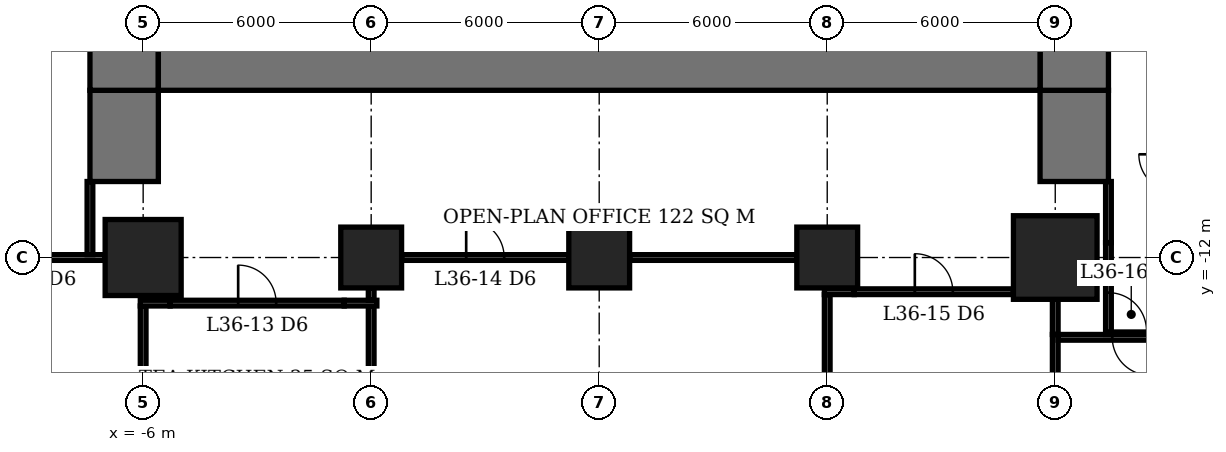
"""IFC4 building model, lengths in metres.
Left out: names, types, materials, properties, quantities, classifications, styles, units other than length and angle.
Written with IfcOpenShell. Run it as: python <this file> out.ifc"""

import sys

from ifc_helpers import new_model, si_unit, direction, frame, frame_2d, origin, origin_2d, place, context, subcontext, project, spatial, rectangle, extrude, element, fill, save


model = new_model("IFC4")
c1 = context("Model", 3, precision=1e-05, world=origin(), true_north=direction((0.0, 1.0)))
c2 = subcontext(c1, "Body", "Model", "MODEL_VIEW")
j1 = project(units=[si_unit("LENGTHUNIT", "METRE"), si_unit("PLANEANGLEUNIT", "RADIAN")], contexts=[c1])
p1 = place(None, origin())
s1 = spatial("IfcSite", under=j1, at=p1, CompositionType="ELEMENT")
p2 = place(p1, origin())
s2 = spatial("IfcBuilding", under=s1, at=p2, CompositionType="ELEMENT")
p3 = place(p2, frame((0.0, 0.0, 148.4)))
s3 = spatial("IfcBuildingStorey", under=s2, at=p3, CompositionType="ELEMENT", Elevation=148.4)
p4 = place(p3, frame((-6.0, -12.0, 0.0), z_axis=(0.0, 0.0, 1.0), x_axis=(1.0, 0.0, 0.0)))
e1 = element("IfcColumn", 1, at=p4, inside=s3, PredefinedType="COLUMN", context=c2, shape_type="SweptSolid", body=[
    extrude(rectangle(XDim=2.0, YDim=2.0, at=origin_2d()), origin(), (0.0, 0.0, 1.0), 3.9),
])
for number, where, z_axis, x_axis in (
    (2, (0.0, -12.0, 0.0), (0.0, 0.0, 1.0), (1.0, 0.0, 0.0)),
    (3, (6.0, -12.0, 0.0), (0.0, 0.0, 1.0), (1.0, 0.0, 0.0)),
    (4, (12.0, -12.0, 0.0), (0.0, 0.0, 1.0), (1.0, 0.0, 0.0)),
):
    element("IfcColumn", number, at=place(p3, frame(where, z_axis=z_axis, x_axis=x_axis)), inside=s3, PredefinedType="COLUMN", context=c2, shape_type="SweptSolid", body=[
        extrude(rectangle(XDim=1.6, YDim=1.6, at=origin_2d()), origin(), (0.0, 0.0, 1.0), 3.9),
    ])
p5 = place(p3, frame((18.0, -12.0, 0.0), z_axis=(0.0, 0.0, 1.0), x_axis=(1.0, 0.0, 0.0)))
e5 = element("IfcColumn", 5, at=p5, inside=s3, PredefinedType="COLUMN", context=c2, shape_type="SweptSolid", body=[
    extrude(rectangle(XDim=2.2, YDim=2.2, at=origin_2d()), origin(), (0.0, 0.0, 1.0), 3.9),
])
p6 = place(p3, frame((-5.6, -6.6, 0.0), z_axis=(0.0, 0.0, 1.0), x_axis=(1.0, 0.0, 0.0)))
e6 = element("IfcWall", 6, at=p6, inside=s3, PredefinedType="SHEAR", context=c2, shape_type="SweptSolid", body=[
    extrude(rectangle(XDim=23.2, YDim=2.0, at=frame_2d((11.6, 0.0))), origin(), (0.0, 0.0, 1.0), 3.9),
])
p7 = place(p3, frame((-6.5, -7.6, 0.0), z_axis=(0.0, 0.0, 1.0), x_axis=(0.0, 1.0, 0.0)))
e7 = element("IfcWall", 7, at=p7, inside=s3, PredefinedType="SHEAR", context=c2, shape_type="SweptSolid", body=[
    extrude(rectangle(XDim=21.2, YDim=1.8, at=frame_2d((10.6, 0.0))), origin(), (0.0, 0.0, 1.0), 3.9),
])
p8 = place(p7, frame((7.8, 0.0, 0.0)))
e8 = element("IfcOpeningElement", 8, at=p8, cuts=e7, PredefinedType="OPENING", context=c2, shape_type="SweptSolid", body=[
    extrude(rectangle(XDim=1.8, YDim=2.4, at=frame_2d((0.9, 1.2))), frame((0.0, 0.91, 0.0), z_axis=(0.0, -1.0, 0.0), x_axis=(1.0, 0.0, 0.0)), (0.0, 0.0, 1.0), 1.82),
])
p9 = place(p3, frame((18.5, -7.6, 0.0), z_axis=(0.0, 0.0, 1.0), x_axis=(0.0, 1.0, 0.0)))
e9 = element("IfcWall", 9, at=p9, inside=s3, PredefinedType="SHEAR", context=c2, shape_type="SweptSolid", body=[
    extrude(rectangle(XDim=21.2, YDim=1.8, at=frame_2d((10.6, 0.0))), origin(), (0.0, 0.0, 1.0), 3.9),
])
p10 = place(p9, frame((9.2, 0.0, 0.0)))
e10 = element("IfcOpeningElement", 10, at=p10, cuts=e9, PredefinedType="OPENING", context=c2, shape_type="SweptSolid", body=[
    extrude(rectangle(XDim=1.8, YDim=2.4, at=frame_2d((0.9, 1.2))), frame((0.0, 0.91, 0.0), z_axis=(0.0, -1.0, 0.0), x_axis=(1.0, 0.0, 0.0)), (0.0, 0.0, 1.0), 1.82),
])
for number, where, z_axis, x_axis in (
    (11, (-6.5, -10.0, 0.0), (0.0, 0.0, 1.0), (0.0, 1.0, 0.0)),
    (12, (18.5, -10.0, 0.0), (0.0, 0.0, 1.0), (0.0, 1.0, 0.0)),
):
    element("IfcWall", number, at=place(p3, frame(where, z_axis=z_axis, x_axis=x_axis)), inside=s3, PredefinedType="SHEAR", context=c2, shape_type="SweptSolid", body=[
        extrude(rectangle(XDim=2.4, YDim=1.8, at=frame_2d((1.2, 0.0))), origin(), (0.0, 0.0, 1.0), 3.9),
    ])
p11 = place(p3, frame((21.892, -14.1, 0.0), z_axis=(0.0, 0.0, 1.0), x_axis=(-1.0, 0.0, 0.0)))
e13 = element("IfcWall", 13, at=p11, inside=s3, PredefinedType="PARTITIONING", context=c2, shape_type="SweptSolid", body=[
    extrude(rectangle(XDim=3.817, YDim=0.15, at=frame_2d((1.909, 0.0))), origin(), (0.0, 0.0, 1.0), 2.65),
])
p12 = place(p11, frame((1.392, 0.0, 0.0)))
e14 = element("IfcOpeningElement", 14, at=p12, cuts=e13, PredefinedType="OPENING", context=c2, shape_type="SweptSolid", body=[
    extrude(rectangle(XDim=1.0, YDim=2.1, at=frame_2d((0.5, 1.05))), frame((0.0, 0.085, 0.0), z_axis=(0.0, -1.0, 0.0), x_axis=(1.0, 0.0, 0.0)), (0.0, 0.0, 1.0), 0.17),
])
p13 = place(p3, frame((-6.075, -13.2, 0.0), z_axis=(0.0, 0.0, 1.0), x_axis=(1.0, 0.0, 0.0)))
e15 = element("IfcWall", 15, at=p13, inside=s3, PredefinedType="PARTITIONING", context=c2, shape_type="SweptSolid", body=[
    extrude(rectangle(XDim=0.785, YDim=0.15, at=frame_2d((0.393, 0.0))), origin(), (0.0, 0.0, 1.0), 2.65),
])
p14 = place(p3, frame((-5.29, -13.2, 0.0), z_axis=(0.0, 0.0, 1.0), x_axis=(1.0, 0.0, 0.0)))
e16 = element("IfcWall", 16, at=p14, inside=s3, PredefinedType="PARTITIONING", context=c2, shape_type="SweptSolid", body=[
    extrude(rectangle(XDim=4.58, YDim=0.15, at=frame_2d((2.29, 0.0))), origin(), (0.0, 0.0, 1.0), 3.65),
])
p15 = place(p14, frame((1.79, 0.0, 0.0)))
e17 = element("IfcOpeningElement", 17, at=p15, cuts=e16, PredefinedType="OPENING", context=c2, shape_type="SweptSolid", body=[
    extrude(rectangle(XDim=1.0, YDim=2.1, at=frame_2d((0.5, 1.05))), frame((0.0, 0.085, 0.0), z_axis=(0.0, -1.0, 0.0), x_axis=(1.0, 0.0, 0.0)), (0.0, 0.0, 1.0), 0.17),
])
p16 = place(p3, frame((-0.71, -13.2, 0.0), z_axis=(0.0, 0.0, 1.0), x_axis=(1.0, 0.0, 0.0)))
e18 = element("IfcWall", 18, at=p16, inside=s3, PredefinedType="PARTITIONING", context=c2, shape_type="SweptSolid", body=[
    extrude(rectangle(XDim=0.86, YDim=0.15, at=frame_2d((0.43, 0.0))), origin(), (0.0, 0.0, 1.0), 2.65),
])
p17 = place(p3, frame((11.925, -12.9, 0.0), z_axis=(0.0, 0.0, 1.0), x_axis=(1.0, 0.0, 0.0)))
e19 = element("IfcWall", 19, at=p17, inside=s3, PredefinedType="PARTITIONING", context=c2, shape_type="SweptSolid", body=[
    extrude(rectangle(XDim=0.785, YDim=0.15, at=frame_2d((0.393, 0.0))), origin(), (0.0, 0.0, 1.0), 2.65),
])
p18 = place(p3, frame((12.71, -12.9, 0.0), z_axis=(0.0, 0.0, 1.0), x_axis=(1.0, 0.0, 0.0)))
e20 = element("IfcWall", 20, at=p18, inside=s3, PredefinedType="PARTITIONING", context=c2, shape_type="SweptSolid", body=[
    extrude(rectangle(XDim=4.19, YDim=0.15, at=frame_2d((2.095, 0.0))), origin(), (0.0, 0.0, 1.0), 3.65),
])
p19 = place(p18, frame((1.595, 0.0, 0.0)))
e21 = element("IfcOpeningElement", 21, at=p19, cuts=e20, PredefinedType="OPENING", context=c2, shape_type="SweptSolid", body=[
    extrude(rectangle(XDim=1.0, YDim=2.1, at=frame_2d((0.5, 1.05))), frame((0.0, 0.085, 0.0), z_axis=(0.0, -1.0, 0.0), x_axis=(1.0, 0.0, 0.0)), (0.0, 0.0, 1.0), 0.17),
])
p20 = place(p3, frame((-11.2, -12.0, 0.0), z_axis=(0.0, 0.0, 1.0), x_axis=(1.0, 0.0, 0.0)))
e22 = element("IfcWall", 22, at=p20, inside=s3, PredefinedType="PARTITIONING", context=c2, shape_type="SweptSolid", body=[
    extrude(rectangle(XDim=4.2, YDim=0.15, at=frame_2d((2.1, 0.0))), origin(), (0.0, 0.0, 1.0), 3.65),
])
p21 = place(p20, frame((1.6, 0.0, 0.0)))
e23 = element("IfcOpeningElement", 23, at=p21, cuts=e22, PredefinedType="OPENING", context=c2, shape_type="SweptSolid", body=[
    extrude(rectangle(XDim=1.0, YDim=2.1, at=frame_2d((0.5, 1.05))), frame((0.0, 0.085, 0.0), z_axis=(0.0, -1.0, 0.0), x_axis=(1.0, 0.0, 0.0)), (0.0, 0.0, 1.0), 0.17),
])
p22 = place(p3, frame((0.8, -12.0, 0.0), z_axis=(0.0, 0.0, 1.0), x_axis=(1.0, 0.0, 0.0)))
e24 = element("IfcWall", 24, at=p22, inside=s3, PredefinedType="PARTITIONING", context=c2, shape_type="SweptSolid", body=[
    extrude(rectangle(XDim=4.4, YDim=0.15, at=frame_2d((2.2, 0.0))), origin(), (0.0, 0.0, 1.0), 3.65),
])
p23 = place(p22, frame((1.7, 0.0, 0.0)))
e25 = element("IfcOpeningElement", 25, at=p23, cuts=e24, PredefinedType="OPENING", context=c2, shape_type="SweptSolid", body=[
    extrude(rectangle(XDim=1.0, YDim=2.1, at=frame_2d((0.5, 1.05))), frame((0.0, 0.085, 0.0), z_axis=(0.0, -1.0, 0.0), x_axis=(1.0, 0.0, 0.0)), (0.0, 0.0, 1.0), 0.17),
])
p24 = place(p3, frame((6.8, -12.0, 0.0), z_axis=(0.0, 0.0, 1.0), x_axis=(1.0, 0.0, 0.0)))
e26 = element("IfcWall", 26, at=p24, inside=s3, PredefinedType="PARTITIONING", context=c2, shape_type="SweptSolid", body=[
    extrude(rectangle(XDim=4.4, YDim=0.15, at=frame_2d((2.2, 0.0))), origin(), (0.0, 0.0, 1.0), 3.65),
])
for number, where, z_axis, x_axis in (
    (27, (-6.0, -16.31, 0.0), (0.0, 0.0, 1.0), (0.0, 1.0, 0.0)),
    (28, (0.0, -16.31, 0.0), (0.0, 0.0, 1.0), (0.0, 1.0, 0.0)),
):
    element("IfcWall", number, at=place(p3, frame(where, z_axis=z_axis, x_axis=x_axis)), inside=s3, PredefinedType="PARTITIONING", context=c2, shape_type="SweptSolid", body=[
        extrude(rectangle(XDim=3.035, YDim=0.15, at=frame_2d((1.518, 0.0))), origin(), (0.0, 0.0, 1.0), 2.65),
    ])
p25 = place(p3, frame((0.0, -13.125, 0.0), z_axis=(0.0, 0.0, 1.0), x_axis=(0.0, 1.0, 0.0)))
e29 = element("IfcWall", 29, at=p25, inside=s3, PredefinedType="PARTITIONING", context=c2, shape_type="SweptSolid", body=[
    extrude(rectangle(XDim=0.325, YDim=0.15, at=frame_2d((0.163, 0.0))), origin(), (0.0, 0.0, 1.0), 2.65),
])
p26 = place(p3, frame((12.0, -16.31, 0.0), z_axis=(0.0, 0.0, 1.0), x_axis=(0.0, 1.0, 0.0)))
e30 = element("IfcWall", 30, at=p26, inside=s3, PredefinedType="PARTITIONING", context=c2, shape_type="SweptSolid", body=[
    extrude(rectangle(XDim=3.335, YDim=0.15, at=frame_2d((1.667, 0.0))), origin(), (0.0, 0.0, 1.0), 2.65),
])
p27 = place(p3, frame((18.0, -16.31, 0.0), z_axis=(0.0, 0.0, 1.0), x_axis=(0.0, 1.0, 0.0)))
e31 = element("IfcWall", 31, at=p27, inside=s3, PredefinedType="PARTITIONING", context=c2, shape_type="SweptSolid", body=[
    extrude(rectangle(XDim=2.285, YDim=0.15, at=frame_2d((1.143, 0.0))), origin(), (0.0, 0.0, 1.0), 2.65),
])
p28 = place(p3, frame((18.0, -14.025, 0.0), z_axis=(0.0, 0.0, 1.0), x_axis=(0.0, 1.0, 0.0)))
e32 = element("IfcWall", 32, at=p28, inside=s3, PredefinedType="PARTITIONING", context=c2, shape_type="SweptSolid", body=[
    extrude(rectangle(XDim=0.925, YDim=0.15, at=frame_2d((0.462, 0.0))), origin(), (0.0, 0.0, 1.0), 2.65),
])
p29 = place(p3, frame((-7.4, -11.925, 0.0), z_axis=(0.0, 0.0, 1.0), x_axis=(0.0, 1.0, 0.0)))
e33 = element("IfcWall", 33, at=p29, inside=s3, PredefinedType="PARTITIONING", context=c2, shape_type="SweptSolid", body=[
    extrude(rectangle(XDim=1.925, YDim=0.15, at=frame_2d((0.962, 0.0))), origin(), (0.0, 0.0, 1.0), 3.65),
])
p30 = place(p3, frame((19.4, -11.608, 0.0), z_axis=(0.0, 0.0, 1.0), x_axis=(0.0, -1.0, 0.0)))
e34 = element("IfcWall", 34, at=p30, inside=s3, PredefinedType="PARTITIONING", context=c2, shape_type="SweptSolid", body=[
    extrude(rectangle(XDim=2.417, YDim=0.15, at=frame_2d((1.208, 0.0))), origin(), (0.0, 0.0, 1.0), 2.65),
])
p31 = place(p30, frame((1.317, 0.0, 0.0)))
e35 = element("IfcOpeningElement", 35, at=p31, cuts=e34, PredefinedType="OPENING", context=c2, shape_type="SweptSolid", body=[
    extrude(rectangle(XDim=1.0, YDim=2.1, at=frame_2d((0.5, 1.05))), frame((0.0, 0.085, 0.0), z_axis=(0.0, -1.0, 0.0), x_axis=(1.0, 0.0, 0.0)), (0.0, 0.0, 1.0), 0.17),
])
p32 = place(p3, frame((19.4, -11.608, 0.0), z_axis=(0.0, 0.0, 1.0), x_axis=(0.0, 1.0, 0.0)))
e36 = element("IfcWall", 36, at=p32, inside=s3, PredefinedType="PARTITIONING", context=c2, shape_type="SweptSolid", body=[
    extrude(rectangle(XDim=1.608, YDim=0.15, at=frame_2d((0.804, 0.0))), origin(), (0.0, 0.0, 1.0), 3.65),
])
p33 = place(p15, origin())
e37 = element("IfcDoor", 37, at=p33, inside=s3, OperationType="SINGLE_SWING_LEFT", PredefinedType="DOOR", context=c2, shape_type="SweptSolid", body=[
    extrude(rectangle(XDim=1.0, YDim=2.1, at=frame_2d((0.5, 1.05))), frame((0.0, 0.025, 0.0), z_axis=(0.0, -1.0, 0.0), x_axis=(1.0, 0.0, 0.0)), (0.0, 0.0, 1.0), 0.05),
])
fill(e17, e37)
p34 = place(p23, origin())
e38 = element("IfcDoor", 38, at=p34, inside=s3, OperationType="SINGLE_SWING_LEFT", PredefinedType="DOOR", context=c2, shape_type="SweptSolid", body=[
    extrude(rectangle(XDim=1.0, YDim=2.1, at=frame_2d((0.5, 1.05))), frame((0.0, 0.025, 0.0), z_axis=(0.0, -1.0, 0.0), x_axis=(1.0, 0.0, 0.0)), (0.0, 0.0, 1.0), 0.05),
])
fill(e25, e38)
p35 = place(p19, origin())
e39 = element("IfcDoor", 39, at=p35, inside=s3, OperationType="SINGLE_SWING_LEFT", PredefinedType="DOOR", context=c2, shape_type="SweptSolid", body=[
    extrude(rectangle(XDim=1.0, YDim=2.1, at=frame_2d((0.5, 1.05))), frame((0.0, 0.025, 0.0), z_axis=(0.0, -1.0, 0.0), x_axis=(1.0, 0.0, 0.0)), (0.0, 0.0, 1.0), 0.05),
])
fill(e21, e39)
p36 = place(p12, origin())
e40 = element("IfcDoor", 40, at=p36, inside=s3, OperationType="SINGLE_SWING_LEFT", PredefinedType="DOOR", context=c2, shape_type="SweptSolid", body=[
    extrude(rectangle(XDim=1.0, YDim=2.1, at=frame_2d((0.5, 1.05))), frame((0.0, 0.025, 0.0), z_axis=(0.0, -1.0, 0.0), x_axis=(1.0, 0.0, 0.0)), (0.0, 0.0, 1.0), 0.05),
])
fill(e14, e40)
p37 = place(p31, origin())
e41 = element("IfcDoor", 41, at=p37, inside=s3, OperationType="SINGLE_SWING_RIGHT", PredefinedType="DOOR", context=c2, shape_type="SweptSolid", body=[
    extrude(rectangle(XDim=1.0, YDim=2.1, at=frame_2d((0.5, 1.05))), frame((0.0, 0.025, 0.0), z_axis=(0.0, -1.0, 0.0), x_axis=(1.0, 0.0, 0.0)), (0.0, 0.0, 1.0), 0.05),
])
fill(e35, e41)
save(model, sys.argv[1])
